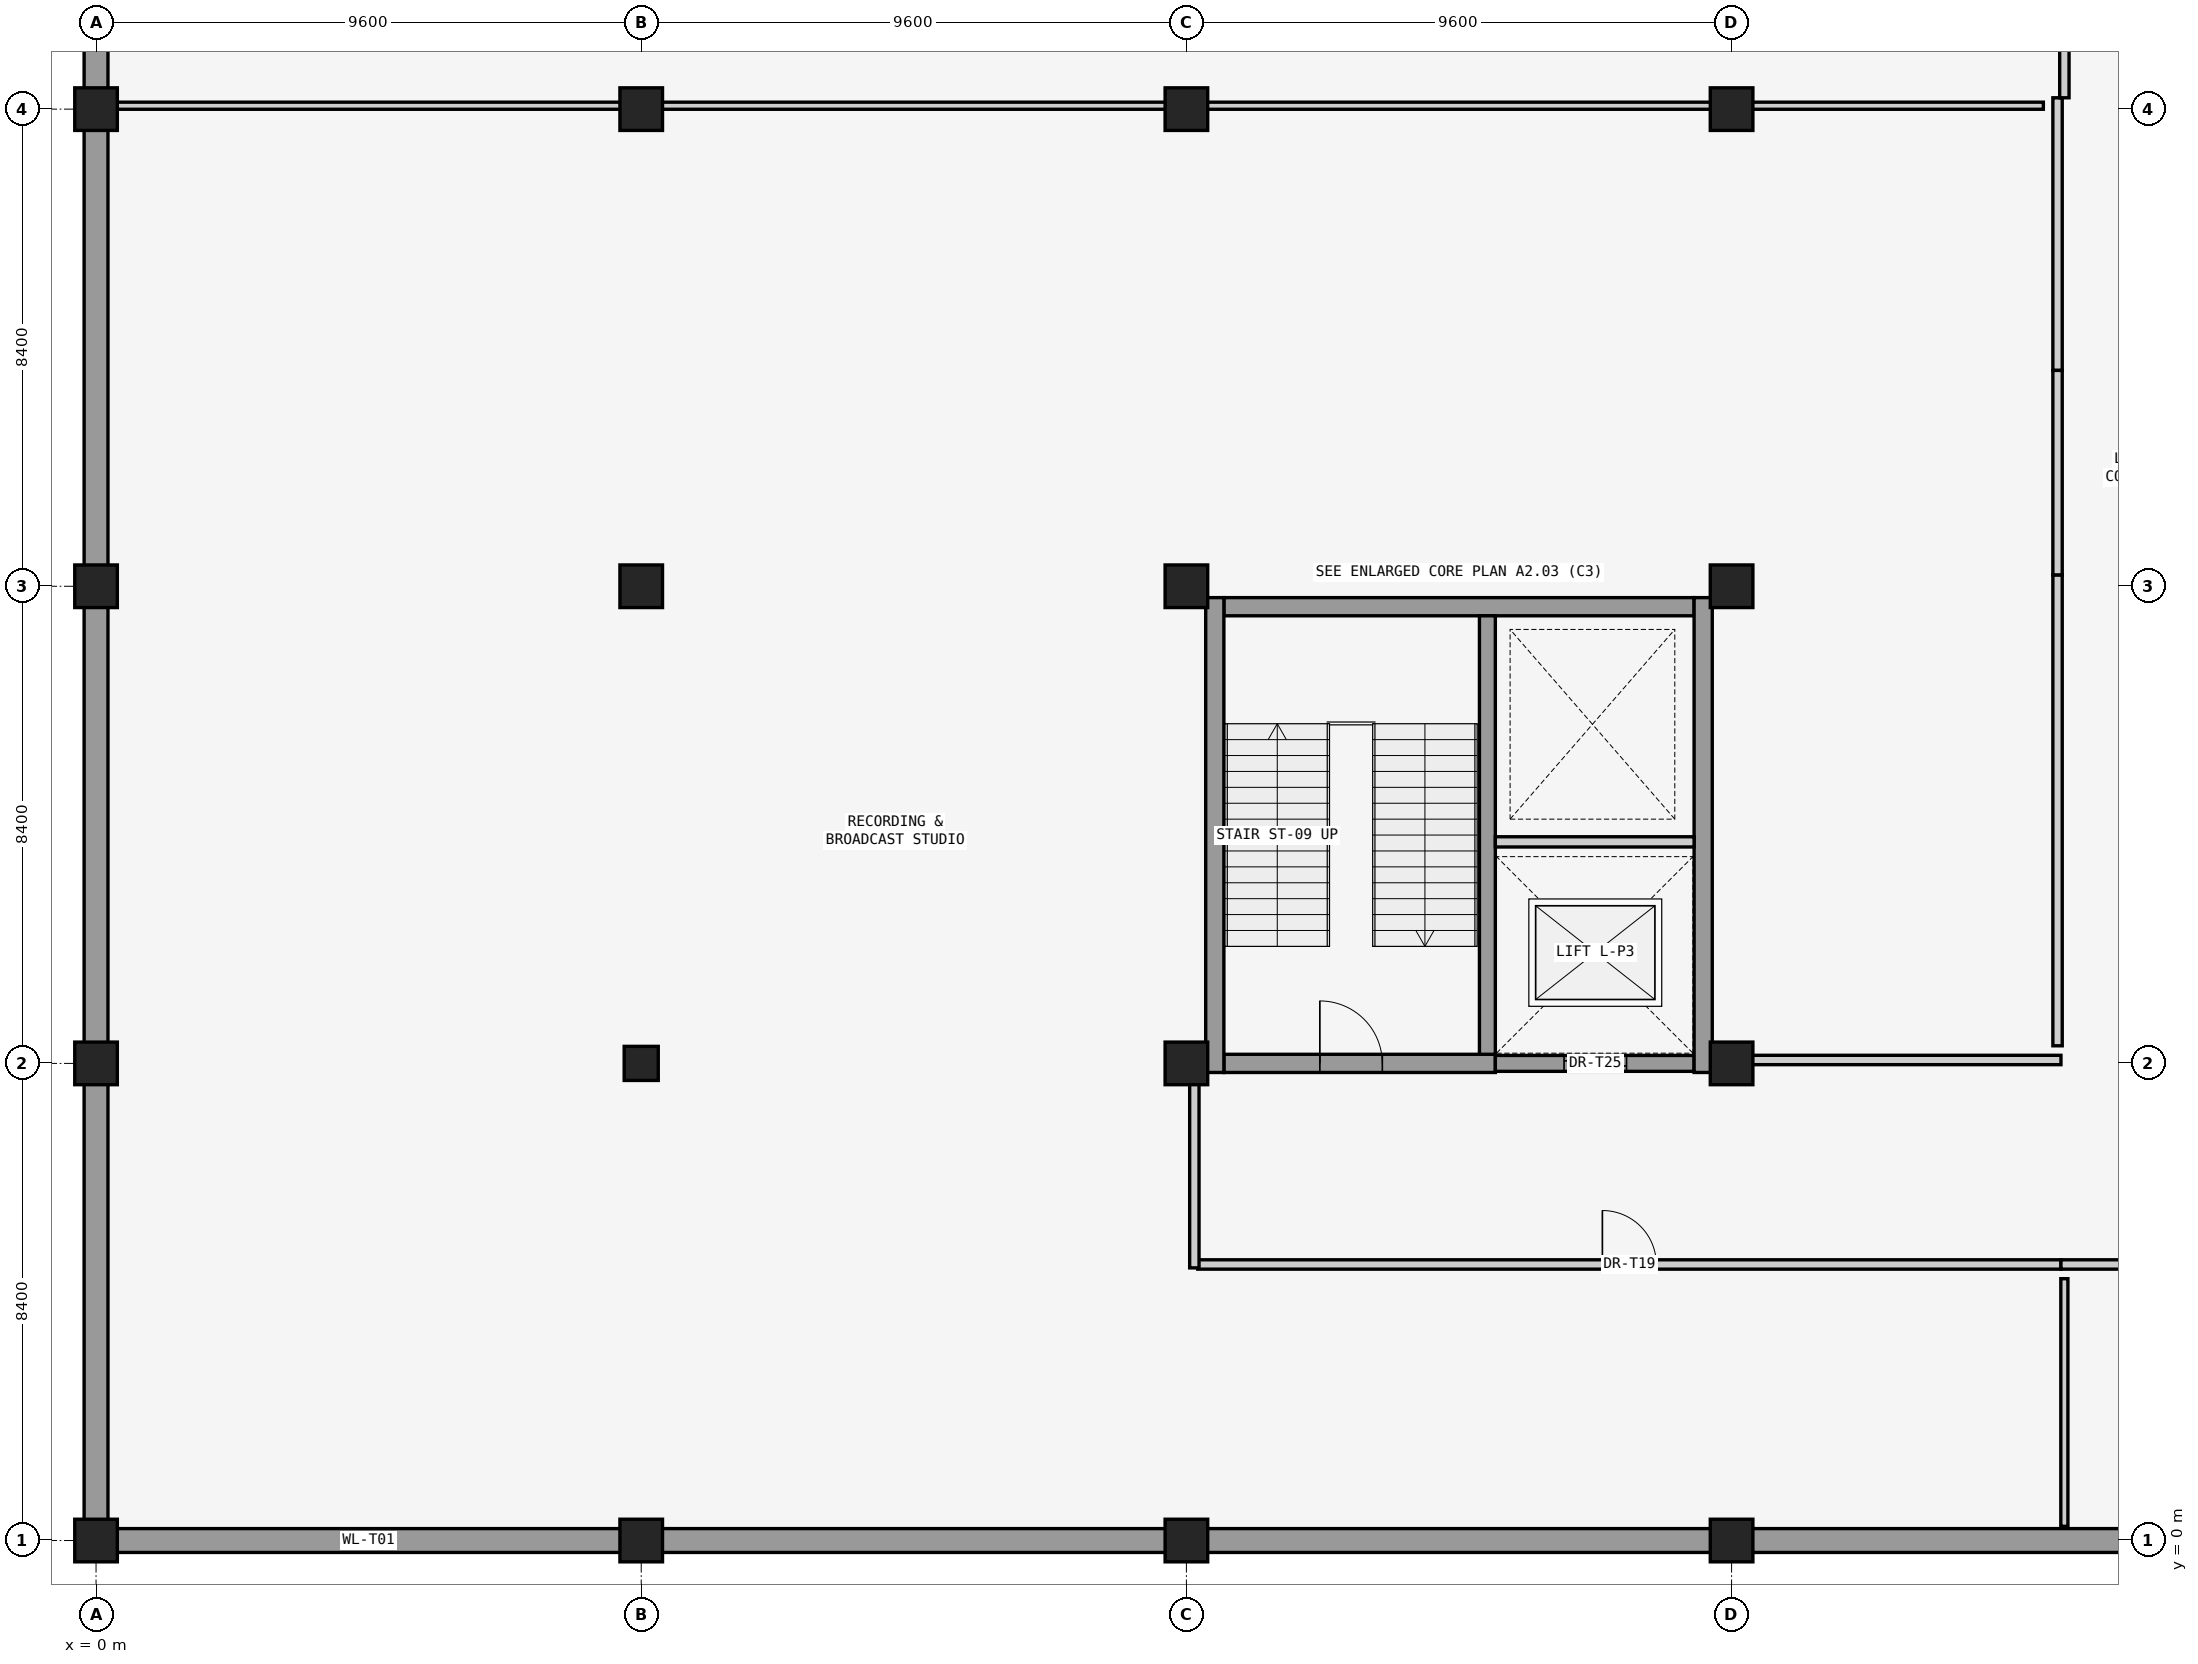
"""IFC4 building model, lengths in metres.
Left out: names, types, materials, properties, quantities, classifications, styles, units other than length and angle.
Written with IfcOpenShell. Run it as: python <this file> out.ifc"""

import sys

from ifc_helpers import new_model, si_unit, direction, frame, frame_2d, origin, origin_2d, place, context, subcontext, project, spatial, rectangle, extrude, element, fill, save


model = new_model("IFC4")
c1 = context("Model", 3, precision=1e-05, world=origin(), true_north=direction((0.0, 1.0)))
c2 = subcontext(c1, "Body", "Model", "MODEL_VIEW")
j1 = project(units=[si_unit("LENGTHUNIT", "METRE"), si_unit("PLANEANGLEUNIT", "RADIAN")], contexts=[c1])
p1 = place(None, origin())
s1 = spatial("IfcSite", under=j1, at=p1, CompositionType="ELEMENT")
p2 = place(p1, origin())
s2 = spatial("IfcBuilding", under=s1, at=p2, CompositionType="ELEMENT")
p3 = place(p2, frame((0.0, 0.0, -4.8)))
s3 = spatial("IfcBuildingStorey", under=s2, at=p3, CompositionType="ELEMENT", Elevation=-4.8)
for number, where, z_axis, x_axis in (
    (1, (0.0, 0.0, 0.0), (0.0, 0.0, 1.0), (1.0, 0.0, 0.0)),
    (2, (0.0, 8.4, 0.0), (0.0, 0.0, 1.0), (1.0, 0.0, 0.0)),
    (3, (0.0, 16.8, 0.0), (0.0, 0.0, 1.0), (1.0, 0.0, 0.0)),
    (4, (0.0, 25.2, 0.0), (0.0, 0.0, 1.0), (1.0, 0.0, 0.0)),
    (5, (9.6, 0.0, 0.0), (0.0, 0.0, 1.0), (1.0, 0.0, 0.0)),
):
    element("IfcColumn", number, at=place(p3, frame(where, z_axis=z_axis, x_axis=x_axis)), inside=s3, PredefinedType="COLUMN", context=c2, shape_type="SweptSolid", body=[
        extrude(rectangle(XDim=0.75, YDim=0.75, at=origin_2d()), origin(), (0.0, 0.0, 1.0), 4.38),
    ])
p4 = place(p3, frame((9.6, 8.4, 0.0), z_axis=(0.0, 0.0, 1.0), x_axis=(1.0, 0.0, 0.0)))
e6 = element("IfcColumn", 6, at=p4, inside=s3, PredefinedType="COLUMN", context=c2, shape_type="SweptSolid", body=[
    extrude(rectangle(XDim=0.6, YDim=0.6, at=origin_2d()), origin(), (0.0, 0.0, 1.0), 4.38),
])
for number, where, z_axis, x_axis in (
    (7, (9.6, 16.8, 0.0), (0.0, 0.0, 1.0), (1.0, 0.0, 0.0)),
    (8, (9.6, 25.2, 0.0), (0.0, 0.0, 1.0), (1.0, 0.0, 0.0)),
    (9, (19.2, 0.0, 0.0), (0.0, 0.0, 1.0), (1.0, 0.0, 0.0)),
    (10, (19.2, 8.4, 0.0), (0.0, 0.0, 1.0), (1.0, 0.0, 0.0)),
    (11, (19.2, 16.8, 0.0), (0.0, 0.0, 1.0), (1.0, 0.0, 0.0)),
    (12, (19.2, 25.2, 0.0), (0.0, 0.0, 1.0), (1.0, 0.0, 0.0)),
    (13, (28.8, 0.0, 0.0), (0.0, 0.0, 1.0), (1.0, 0.0, 0.0)),
    (14, (28.8, 8.4, 0.0), (0.0, 0.0, 1.0), (1.0, 0.0, 0.0)),
    (15, (28.8, 16.8, 0.0), (0.0, 0.0, 1.0), (1.0, 0.0, 0.0)),
    (16, (28.8, 25.2, 0.0), (0.0, 0.0, 1.0), (1.0, 0.0, 0.0)),
):
    element("IfcColumn", number, at=place(p3, frame(where, z_axis=z_axis, x_axis=x_axis)), inside=s3, PredefinedType="COLUMN", context=c2, shape_type="SweptSolid", body=[
        extrude(rectangle(XDim=0.75, YDim=0.75, at=origin_2d()), origin(), (0.0, 0.0, 1.0), 4.38),
    ])
p5 = place(p3, frame((9.6, 0.0, 0.0), z_axis=(0.0, 0.0, 1.0), x_axis=(-1.0, 0.0, 0.0)))
e17 = element("IfcWall", 17, at=p5, inside=s3, PredefinedType="USERDEFINED", context=c2, shape_type="SweptSolid", body=[
    extrude(rectangle(XDim=9.6, YDim=0.42, at=frame_2d((4.8, 0.0))), origin(), (0.0, 0.0, 1.0), 4.36),
])
p6 = place(p3, frame((0.0, 0.0, 0.0), z_axis=(0.0, 0.0, 1.0), x_axis=(0.0, 1.0, 0.0)))
e18 = element("IfcWall", 18, at=p6, inside=s3, PredefinedType="USERDEFINED", context=c2, shape_type="SweptSolid", body=[
    extrude(rectangle(XDim=8.4, YDim=0.42, at=frame_2d((4.2, 0.0))), origin(), (0.0, 0.0, 1.0), 4.36),
])
p7 = place(p3, frame((0.0, 8.4, 0.0), z_axis=(0.0, 0.0, 1.0), x_axis=(0.0, 1.0, 0.0)))
e19 = element("IfcWall", 19, at=p7, inside=s3, PredefinedType="USERDEFINED", context=c2, shape_type="SweptSolid", body=[
    extrude(rectangle(XDim=8.4, YDim=0.42, at=frame_2d((4.2, 0.0))), origin(), (0.0, 0.0, 1.0), 4.36),
])
p8 = place(p3, frame((0.0, 16.8, 0.0), z_axis=(0.0, 0.0, 1.0), x_axis=(0.0, 1.0, 0.0)))
e20 = element("IfcWall", 20, at=p8, inside=s3, PredefinedType="USERDEFINED", context=c2, shape_type="SweptSolid", body=[
    extrude(rectangle(XDim=8.4, YDim=0.42, at=frame_2d((4.2, 0.0))), origin(), (0.0, 0.0, 1.0), 4.36),
])
p9 = place(p3, frame((0.0, 25.2, 0.0), z_axis=(0.0, 0.0, 1.0), x_axis=(0.0, 1.0, 0.0)))
e21 = element("IfcWall", 21, at=p9, inside=s3, PredefinedType="USERDEFINED", context=c2, shape_type="SweptSolid", body=[
    extrude(rectangle(XDim=8.4, YDim=0.42, at=frame_2d((4.2, 0.0))), origin(), (0.0, 0.0, 1.0), 4.55),
])
p10 = place(p3, frame((19.2, 0.0, 0.0), z_axis=(0.0, 0.0, 1.0), x_axis=(-1.0, 0.0, 0.0)))
e22 = element("IfcWall", 22, at=p10, inside=s3, PredefinedType="USERDEFINED", context=c2, shape_type="SweptSolid", body=[
    extrude(rectangle(XDim=9.6, YDim=0.42, at=frame_2d((4.8, 0.0))), origin(), (0.0, 0.0, 1.0), 4.36),
])
p11 = place(p3, frame((28.8, 0.0, 0.0), z_axis=(0.0, 0.0, 1.0), x_axis=(-1.0, 0.0, 0.0)))
e23 = element("IfcWall", 23, at=p11, inside=s3, PredefinedType="USERDEFINED", context=c2, shape_type="SweptSolid", body=[
    extrude(rectangle(XDim=9.6, YDim=0.42, at=frame_2d((4.8, 0.0))), origin(), (0.0, 0.0, 1.0), 4.36),
])
p12 = place(p3, frame((38.4, 0.0, 0.0), z_axis=(0.0, 0.0, 1.0), x_axis=(-1.0, 0.0, 0.0)))
e24 = element("IfcWall", 24, at=p12, inside=s3, PredefinedType="USERDEFINED", context=c2, shape_type="SweptSolid", body=[
    extrude(rectangle(XDim=9.6, YDim=0.42, at=frame_2d((4.8, 0.0))), origin(), (0.0, 0.0, 1.0), 4.36),
])
p13 = place(p3, frame((19.86, 8.4, 0.0), z_axis=(0.0, 0.0, 1.0), x_axis=(1.0, 0.0, 0.0)))
e25 = element("IfcWall", 25, at=p13, inside=s3, PredefinedType="SHEAR", context=c2, shape_type="SweptSolid", body=[
    extrude(rectangle(XDim=4.78, YDim=0.32, at=frame_2d((2.39, 0.0))), origin(), (0.0, 0.0, 1.0), 4.36),
])
p14 = place(p13, frame((1.69, 0.0, 0.0)))
e26 = element("IfcOpeningElement", 26, at=p14, cuts=e25, PredefinedType="OPENING", context=c2, shape_type="SweptSolid", body=[
    extrude(rectangle(XDim=1.1, YDim=2.2, at=frame_2d((0.55, 1.1))), frame((0.0, 0.17, 0.0), z_axis=(0.0, -1.0, 0.0), x_axis=(1.0, 0.0, 0.0)), (0.0, 0.0, 1.0), 0.34),
])
p15 = place(p3, frame((24.64, 8.4, 0.0), z_axis=(0.0, 0.0, 1.0), x_axis=(1.0, 0.0, 0.0)))
e27 = element("IfcWall", 27, at=p15, inside=s3, PredefinedType="SHEAR", context=c2, shape_type="SweptSolid", body=[
    extrude(rectangle(XDim=3.5, YDim=0.28, at=frame_2d((1.75, 0.0))), origin(), (0.0, 0.0, 1.0), 4.36),
])
p16 = place(p15, frame((1.21, 0.0, 0.0)))
e28 = element("IfcOpeningElement", 28, at=p16, cuts=e27, PredefinedType="OPENING", context=c2, shape_type="SweptSolid", body=[
    extrude(rectangle(XDim=1.1, YDim=2.2, at=frame_2d((0.55, 1.1))), frame((0.0, 0.15, 0.0), z_axis=(0.0, -1.0, 0.0), x_axis=(1.0, 0.0, 0.0)), (0.0, 0.0, 1.0), 0.3),
])
p17 = place(p3, frame((28.14, 16.44, 0.0), z_axis=(0.0, 0.0, 1.0), x_axis=(-1.0, 0.0, 0.0)))
e29 = element("IfcWall", 29, at=p17, inside=s3, PredefinedType="SHEAR", context=c2, shape_type="SweptSolid", body=[
    extrude(rectangle(XDim=8.28, YDim=0.32, at=frame_2d((4.14, 0.0))), origin(), (0.0, 0.0, 1.0), 4.36),
])
for number, where, z_axis, x_axis in (
    (30, (19.7, 16.6, 0.0), (0.0, 0.0, 1.0), (0.0, -1.0, 0.0)),
    (31, (28.3, 8.24, 0.0), (0.0, 0.0, 1.0), (0.0, 1.0, 0.0)),
):
    element("IfcWall", number, at=place(p3, frame(where, z_axis=z_axis, x_axis=x_axis)), inside=s3, PredefinedType="SHEAR", context=c2, shape_type="SweptSolid", body=[
        extrude(rectangle(XDim=8.36, YDim=0.32, at=frame_2d((4.18, 0.0))), origin(), (0.0, 0.0, 1.0), 4.36),
    ])
p18 = place(p3, frame((24.5, 8.56, 0.0), z_axis=(0.0, 0.0, 1.0), x_axis=(0.0, 1.0, 0.0)))
e32 = element("IfcWall", 32, at=p18, inside=s3, PredefinedType="SHEAR", context=c2, shape_type="SweptSolid", body=[
    extrude(rectangle(XDim=7.72, YDim=0.28, at=frame_2d((3.86, 0.0))), origin(), (0.0, 0.0, 1.0), 4.36),
])
p19 = place(p3, frame((24.64, 12.3, 0.0), z_axis=(0.0, 0.0, 1.0), x_axis=(1.0, 0.0, 0.0)))
e33 = element("IfcWall", 33, at=p19, inside=s3, PredefinedType="SOLIDWALL", context=c2, shape_type="SweptSolid", body=[
    extrude(rectangle(XDim=3.5, YDim=0.18, at=frame_2d((1.75, 0.0))), origin(), (0.0, 0.0, 1.0), 4.36),
])
p20 = place(p3, frame((34.54, 20.6, 0.0), z_axis=(0.0, 0.0, 1.0), x_axis=(0.0, 1.0, 0.0)))
e34 = element("IfcWall", 34, at=p20, inside=s3, PredefinedType="PARTITIONING", context=c2, shape_type="SweptSolid", body=[
    extrude(rectangle(XDim=4.8, YDim=0.165, at=frame_2d((2.4, 0.0))), origin(), (0.0, 0.0, 1.0), 4.33),
])
p21 = place(p3, frame((19.4, 4.86, 0.0), z_axis=(0.0, 0.0, 1.0), x_axis=(1.0, 0.0, 0.0)))
e35 = element("IfcWall", 35, at=p21, inside=s3, PredefinedType="PARTITIONING", context=c2, shape_type="SweptSolid", body=[
    extrude(rectangle(XDim=15.2, YDim=0.165, at=frame_2d((7.6, 0.0))), origin(), (0.0, 0.0, 1.0), 4.33),
])
p22 = place(p21, frame((7.125, 0.0, 0.0)))
e36 = element("IfcOpeningElement", 36, at=p22, cuts=e35, PredefinedType="OPENING", context=c2, shape_type="SweptSolid", body=[
    extrude(rectangle(XDim=0.95, YDim=2.15, at=frame_2d((0.475, 1.075))), frame((0.0, 0.093, 0.0), z_axis=(0.0, -1.0, 0.0), x_axis=(1.0, 0.0, 0.0)), (0.0, 0.0, 1.0), 0.185),
])
p23 = place(p3, frame((19.34, 4.8, 0.0), z_axis=(0.0, 0.0, 1.0), x_axis=(0.0, 1.0, 0.0)))
e37 = element("IfcWall", 37, at=p23, inside=s3, PredefinedType="PARTITIONING", context=c2, shape_type="SweptSolid", body=[
    extrude(rectangle(XDim=3.6, YDim=0.165, at=frame_2d((1.8, 0.0))), origin(), (0.0, 0.0, 1.0), 3.56),
])
p24 = place(p3, frame((28.55, 8.46, 0.0), z_axis=(0.0, 0.0, 1.0), x_axis=(1.0, 0.0, 0.0)))
e38 = element("IfcWall", 38, at=p24, inside=s3, PredefinedType="PARTITIONING", context=c2, shape_type="SweptSolid", body=[
    extrude(rectangle(XDim=6.05, YDim=0.165, at=frame_2d((3.025, 0.0))), origin(), (0.0, 0.0, 1.0), 3.36),
])
p25 = place(p3, frame((34.54, 8.71, 0.0), z_axis=(0.0, 0.0, 1.0), x_axis=(0.0, 1.0, 0.0)))
e39 = element("IfcWall", 39, at=p25, inside=s3, PredefinedType="PARTITIONING", context=c2, shape_type="SweptSolid", body=[
    extrude(rectangle(XDim=8.29, YDim=0.165, at=frame_2d((4.145, 0.0))), origin(), (0.0, 0.0, 1.0), 4.33),
])
p26 = place(p3, frame((34.54, 17.0, 0.0), z_axis=(0.0, 0.0, 1.0), x_axis=(0.0, 1.0, 0.0)))
e40 = element("IfcWall", 40, at=p26, inside=s3, PredefinedType="PARTITIONING", context=c2, shape_type="SweptSolid", body=[
    extrude(rectangle(XDim=3.6, YDim=0.165, at=frame_2d((1.8, 0.0))), origin(), (0.0, 0.0, 1.0), 4.33),
])
p27 = place(p3, frame((34.66, 25.4, 0.0), z_axis=(0.0, 0.0, 1.0), x_axis=(0.0, 1.0, 0.0)))
e41 = element("IfcWall", 41, at=p27, inside=s3, PredefinedType="PARTITIONING", context=c2, shape_type="SweptSolid", body=[
    extrude(rectangle(XDim=55.0, YDim=0.165, at=frame_2d((27.5, 0.0))), origin(), (0.0, 0.0, 1.0), 4.33),
])
p28 = place(p27, frame((27.025, 0.0, 0.0)))
e42 = element("IfcOpeningElement", 42, at=p28, cuts=e41, PredefinedType="OPENING", context=c2, shape_type="SweptSolid", body=[
    extrude(rectangle(XDim=0.95, YDim=2.15, at=frame_2d((0.475, 1.075))), frame((0.0, 0.093, 0.0), z_axis=(0.0, -1.0, 0.0), x_axis=(1.0, 0.0, 0.0)), (0.0, 0.0, 1.0), 0.185),
])
p29 = place(p3, frame((34.6, 4.86, 0.0), z_axis=(0.0, 0.0, 1.0), x_axis=(1.0, 0.0, 0.0)))
e43 = element("IfcWall", 43, at=p29, inside=s3, PredefinedType="PARTITIONING", context=c2, shape_type="SweptSolid", body=[
    extrude(rectangle(XDim=3.41, YDim=0.165, at=frame_2d((1.705, 0.0))), origin(), (0.0, 0.0, 1.0), 4.33),
])
p30 = place(p3, frame((0.25, 25.26, 0.0), z_axis=(0.0, 0.0, 1.0), x_axis=(1.0, 0.0, 0.0)))
e44 = element("IfcWall", 44, at=p30, inside=s3, PredefinedType="PARTITIONING", context=c2, shape_type="SweptSolid", body=[
    extrude(rectangle(XDim=34.04, YDim=0.125, at=frame_2d((17.02, 0.0))), origin(), (0.0, 0.0, 1.0), 3.36),
])
p31 = place(p3, frame((34.66, 0.25, 0.0), z_axis=(0.0, 0.0, 1.0), x_axis=(0.0, 1.0, 0.0)))
e45 = element("IfcWall", 45, at=p31, inside=s3, PredefinedType="PARTITIONING", context=c2, shape_type="SweptSolid", body=[
    extrude(rectangle(XDim=4.36, YDim=0.125, at=frame_2d((2.18, 0.0))), origin(), (0.0, 0.0, 1.0), 4.33),
])
p32 = place(p14, origin())
e46 = element("IfcDoor", 46, at=p32, inside=s3, OperationType="SINGLE_SWING_LEFT", PredefinedType="DOOR", context=c2, shape_type="SweptSolid", body=[
    extrude(rectangle(XDim=1.1, YDim=2.2, at=frame_2d((0.55, 1.1))), frame((0.0, 0.025, 0.0), z_axis=(0.0, -1.0, 0.0), x_axis=(1.0, 0.0, 0.0)), (0.0, 0.0, 1.0), 0.05),
])
fill(e26, e46)
p33 = place(p16, origin())
e47 = element("IfcDoor", 47, at=p33, inside=s3, OperationType="SLIDING_TO_LEFT", PredefinedType="DOOR", context=c2, shape_type="SweptSolid", body=[
    extrude(rectangle(XDim=1.1, YDim=2.2, at=frame_2d((0.55, 1.1))), frame((0.0, 0.025, 0.0), z_axis=(0.0, -1.0, 0.0), x_axis=(1.0, 0.0, 0.0)), (0.0, 0.0, 1.0), 0.05),
])
fill(e28, e47)
p34 = place(p22, origin())
e48 = element("IfcDoor", 48, at=p34, inside=s3, OperationType="SINGLE_SWING_LEFT", PredefinedType="DOOR", context=c2, shape_type="SweptSolid", body=[
    extrude(rectangle(XDim=0.95, YDim=2.15, at=frame_2d((0.475, 1.075))), frame((0.0, 0.025, 0.0), z_axis=(0.0, -1.0, 0.0), x_axis=(1.0, 0.0, 0.0)), (0.0, 0.0, 1.0), 0.05),
])
fill(e36, e48)
save(model, sys.argv[1])
